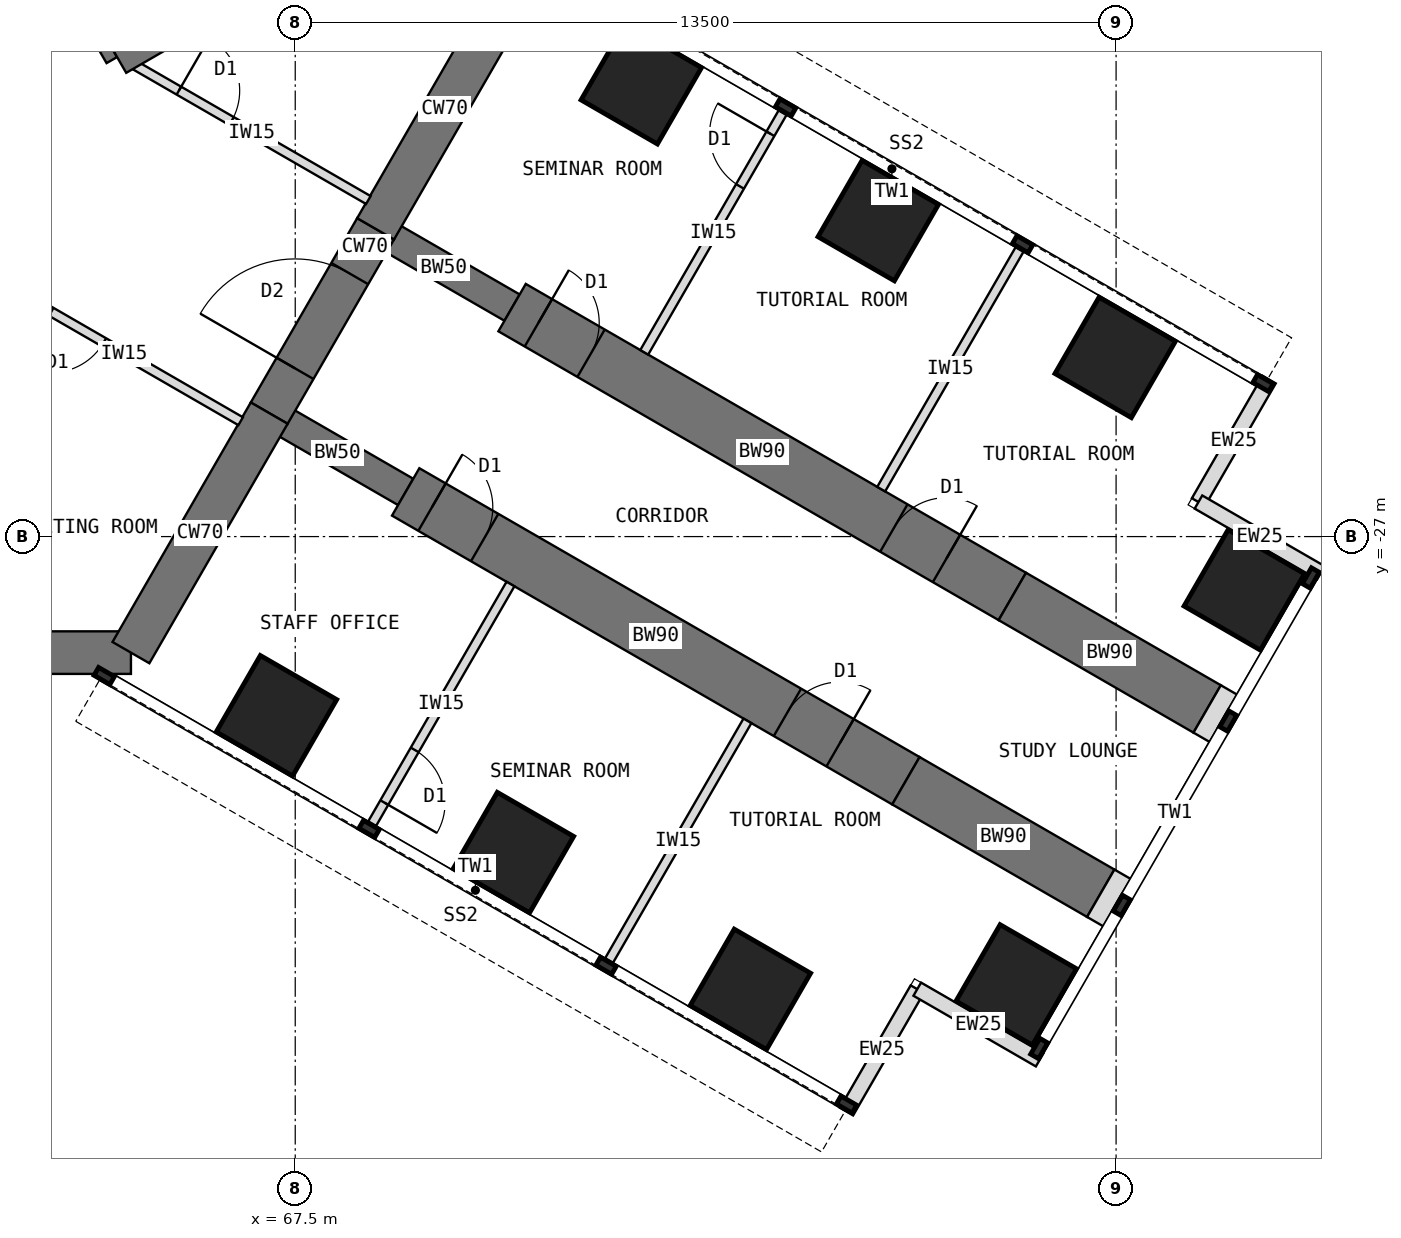
"""IFC4 building model, lengths in metres.
Left out: names, types, materials, properties, quantities, classifications, styles, units other than length and angle.
Written with IfcOpenShell. Run it as: python <this file> out.ifc"""

import sys

from ifc_helpers import new_model, si_unit, direction, frame, frame_2d, origin, origin_2d, place, context, subcontext, project, spatial, rectangle, extrude, element, fill, save


model = new_model("IFC4")
c1 = context("Model", 3, precision=1e-05, world=origin(), true_north=direction((0.0, 1.0)))
c2 = subcontext(c1, "Body", "Model", "MODEL_VIEW")
j1 = project(units=[si_unit("LENGTHUNIT", "METRE"), si_unit("PLANEANGLEUNIT", "RADIAN")], contexts=[c1])
p1 = place(None, origin())
s1 = spatial("IfcSite", under=j1, at=p1, CompositionType="ELEMENT")
p2 = place(p1, origin())
s2 = spatial("IfcBuilding", under=s1, at=p2, CompositionType="ELEMENT")
p3 = place(p2, frame((0.0, 0.0, 68.5)))
s3 = spatial("IfcBuildingStorey", under=s2, at=p3, CompositionType="ELEMENT", Elevation=68.5)
p4 = place(p3, frame((52.202, -28.908, 0.0), z_axis=(0.0, 0.0, 1.0), x_axis=(1.0, 0.0, 0.0)))
e1 = element("IfcWall", 1, at=p4, inside=s3, PredefinedType="SHEAR", context=c2, shape_type="SweptSolid", body=[
    extrude(rectangle(XDim=12.596, YDim=0.7, at=frame_2d((6.298, 0.0))), origin(), (0.0, 0.0, 1.0), 4.0),
])
p5 = place(p3, frame((64.798, -28.908, 0.0), z_axis=(0.0, 0.0, 1.0), x_axis=(0.499984222037, 0.866034513004, 0.0)))
e2 = element("IfcWall", 2, at=p5, inside=s3, PredefinedType="SHEAR", context=c2, shape_type="SweptSolid", body=[
    extrude(rectangle(XDim=4.548, YDim=0.7, at=frame_2d((2.274, 0.0))), origin(), (0.0, 0.0, 1.0), 4.0),
])
p6 = place(p3, frame((67.072, -24.97, 0.0), z_axis=(0.0, 0.0, 1.0), x_axis=(0.500010275428, 0.866019471182, 0.0)))
e3 = element("IfcWall", 3, at=p6, inside=s3, PredefinedType="SHEAR", context=c2, shape_type="SweptSolid", body=[
    extrude(rectangle(XDim=3.5, YDim=0.7, at=frame_2d((1.75, 0.0))), origin(), (0.0, 0.0, 1.0), 4.0),
])
p7 = place(p6, frame((0.85, 0.0, 0.0)))
e4 = element("IfcOpeningElement", 4, at=p7, cuts=e3, PredefinedType="OPENING", context=c2, shape_type="SweptSolid", body=[
    extrude(rectangle(XDim=1.8, YDim=2.1, at=frame_2d((0.9, 1.05))), frame((0.0, 0.36, 0.0), z_axis=(0.0, -1.0, 0.0), x_axis=(1.0, 0.0, 0.0)), (0.0, 0.0, 1.0), 0.72),
])
p8 = place(p3, frame((68.822, -21.939, 0.0), z_axis=(0.0, 0.0, 1.0), x_axis=(0.500024481964, 0.866011268655, 0.0)))
e5 = element("IfcWall", 5, at=p8, inside=s3, PredefinedType="SHEAR", context=c2, shape_type="SweptSolid", body=[
    extrude(rectangle(XDim=4.548, YDim=0.7, at=frame_2d((2.274, 0.0))), origin(), (0.0, 0.0, 1.0), 4.0),
])
p9 = place(p3, frame((68.822, -21.939, 0.0), z_axis=(0.0, 0.0, 1.0), x_axis=(0.866072649678, -0.499918158782, 0.0)))
e6 = element("IfcWall", 6, at=p9, inside=s3, PredefinedType="SHEAR", context=c2, shape_type="SweptSolid", body=[
    extrude(rectangle(XDim=2.592, YDim=0.5, at=frame_2d((1.296, 0.0))), origin(), (0.0, 0.0, 1.0), 4.0),
])
p10 = place(p3, frame((71.066, -23.234, 0.0), z_axis=(0.0, 0.0, 1.0), x_axis=(0.86602681393, -0.499997557548, 0.0)))
e7 = element("IfcWall", 7, at=p10, inside=s3, PredefinedType="SHEAR", context=c2, shape_type="SweptSolid", body=[
    extrude(rectangle(XDim=9.5, YDim=0.9, at=frame_2d((4.75, 0.0))), origin(), (0.0, 0.0, 1.0), 4.0),
])
p11 = place(p10, frame((0.5, 0.0, 0.0)))
e8 = element("IfcOpeningElement", 8, at=p11, cuts=e7, PredefinedType="OPENING", context=c2, shape_type="SweptSolid", body=[
    extrude(rectangle(XDim=1.0, YDim=2.1, at=frame_2d((0.5, 1.05))), frame((0.0, 0.46, 0.0), z_axis=(0.0, -1.0, 0.0), x_axis=(1.0, 0.0, 0.0)), (0.0, 0.0, 1.0), 0.92),
])
p12 = place(p10, frame((7.25, 0.0, 0.0)))
e9 = element("IfcOpeningElement", 9, at=p12, cuts=e7, PredefinedType="OPENING", context=c2, shape_type="SweptSolid", body=[
    extrude(rectangle(XDim=1.0, YDim=2.1, at=frame_2d((0.5, 1.05))), frame((0.0, 0.46, 0.0), z_axis=(0.0, -1.0, 0.0), x_axis=(1.0, 0.0, 0.0)), (0.0, 0.0, 1.0), 0.92),
])
p13 = place(p3, frame((79.294, -27.984, 0.0), z_axis=(0.0, 0.0, 1.0), x_axis=(0.866000971088, -0.500042316284, 0.0)))
e10 = element("IfcWall", 10, at=p13, inside=s3, PredefinedType="SHEAR", context=c2, shape_type="SweptSolid", body=[
    extrude(rectangle(XDim=3.7, YDim=0.9, at=frame_2d((1.85, 0.0))), origin(), (0.0, 0.0, 1.0), 4.0),
])
p14 = place(p3, frame((67.072, -24.97, 0.0), z_axis=(0.0, 0.0, 1.0), x_axis=(0.866031863473, -0.499988811324, 0.0)))
e11 = element("IfcWall", 11, at=p14, inside=s3, PredefinedType="SHEAR", context=c2, shape_type="SweptSolid", body=[
    extrude(rectangle(XDim=2.592, YDim=0.5, at=frame_2d((1.296, 0.0))), origin(), (0.0, 0.0, 1.0), 4.0),
])
p15 = place(p3, frame((69.316, -26.266, 0.0), z_axis=(0.0, 0.0, 1.0), x_axis=(0.86602681393, -0.499997557548, 0.0)))
e12 = element("IfcWall", 12, at=p15, inside=s3, PredefinedType="SHEAR", context=c2, shape_type="SweptSolid", body=[
    extrude(rectangle(XDim=9.5, YDim=0.9, at=frame_2d((4.75, 0.0))), origin(), (0.0, 0.0, 1.0), 4.0),
])
p16 = place(p15, frame((0.5, 0.0, 0.0)))
e13 = element("IfcOpeningElement", 13, at=p16, cuts=e12, PredefinedType="OPENING", context=c2, shape_type="SweptSolid", body=[
    extrude(rectangle(XDim=1.0, YDim=2.1, at=frame_2d((0.5, 1.05))), frame((0.0, 0.46, 0.0), z_axis=(0.0, -1.0, 0.0), x_axis=(1.0, 0.0, 0.0)), (0.0, 0.0, 1.0), 0.92),
])
p17 = place(p15, frame((7.25, 0.0, 0.0)))
e14 = element("IfcOpeningElement", 14, at=p17, cuts=e12, PredefinedType="OPENING", context=c2, shape_type="SweptSolid", body=[
    extrude(rectangle(XDim=1.0, YDim=2.1, at=frame_2d((0.5, 1.05))), frame((0.0, 0.46, 0.0), z_axis=(0.0, -1.0, 0.0), x_axis=(1.0, 0.0, 0.0)), (0.0, 0.0, 1.0), 0.92),
])
p18 = place(p3, frame((77.544, -31.016, 0.0), z_axis=(0.0, 0.0, 1.0), x_axis=(0.866029545028, -0.499992827086, 0.0)))
e15 = element("IfcWall", 15, at=p18, inside=s3, PredefinedType="SHEAR", context=c2, shape_type="SweptSolid", body=[
    extrude(rectangle(XDim=3.7, YDim=0.9, at=frame_2d((1.85, 0.0))), origin(), (0.0, 0.0, 1.0), 4.0),
])
for number, where, z_axis, x_axis in (
    (16, (73.191, -19.554, 0.0), (0.0, 0.0, 1.0), (0.5, 0.866, 0.0)),
    (17, (67.191, -29.946, 0.0), (0.0, 0.0, 1.0), (0.5, 0.866, 0.0)),
    (18, (77.088, -21.804, 0.0), (0.0, 0.0, 1.0), (0.5, 0.866, 0.0)),
    (19, (71.088, -32.196, 0.0), (0.0, 0.0, 1.0), (0.5, 0.866, 0.0)),
    (20, (80.986, -24.054, 0.0), (0.0, 0.0, 1.0), (0.5, 0.866, 0.0)),
    (21, (74.986, -34.446, 0.0), (0.0, 0.0, 1.0), (0.5, 0.866, 0.0)),
    (22, (83.108, -27.877, 0.0), (0.0, 0.0, 1.0), (0.5, 0.866, 0.0)),
    (23, (79.358, -34.373, 0.0), (0.0, 0.0, 1.0), (0.5, 0.866, 0.0)),
):
    element("IfcColumn", number, at=place(p3, frame(where, z_axis=z_axis, x_axis=x_axis)), inside=s3, PredefinedType="COLUMN", context=c2, shape_type="SweptSolid", body=[
        extrude(rectangle(XDim=1.45, YDim=1.45, at=origin_2d()), origin(), (0.0, 0.0, 1.0), 4.0),
    ])
for number, where, z_axis, x_axis in (
    (24, (83.517, -24.419, 0.0), (0.0, 0.0, 1.0), (-0.5, -0.866, 0.0)),
    (25, (82.355, -26.432, 0.0), (0.0, 0.0, 1.0), (0.866, -0.5, 0.0)),
    (26, (76.567, -36.456, 0.0), (0.0, 0.0, 1.0), (0.5, 0.866, 0.0)),
    (27, (77.73, -34.443, 0.0), (0.0, 0.0, 1.0), (0.866, -0.5, 0.0)),
):
    element("IfcWall", number, at=place(p3, frame(where, z_axis=z_axis, x_axis=x_axis)), inside=s3, PredefinedType="STANDARD", context=c2, shape_type="SweptSolid", body=[
        extrude(rectangle(XDim=2.325, YDim=0.25, at=frame_2d((1.163, 0.0))), origin(), (0.0, 0.0, 1.0), 3.8),
    ])
for number, where, z_axis, x_axis in (
    (28, (82.498, -29.834, 0.0), (0.0, 0.0, 1.0), (0.866, -0.5, 0.0)),
    (29, (80.748, -32.865, 0.0), (0.0, 0.0, 1.0), (0.866, -0.5, 0.0)),
):
    element("IfcWall", number, at=place(p3, frame(where, z_axis=z_axis, x_axis=x_axis)), inside=s3, PredefinedType="PARTITIONING", context=c2, shape_type="SweptSolid", body=[
        extrude(rectangle(XDim=0.31, YDim=0.9, at=frame_2d((0.155, 0.0))), origin(), (0.0, 0.0, 1.0), 3.8),
    ])
p19 = place(p3, frame((64.484, -19.164, 0.0), z_axis=(0.0, 0.0, 1.0), x_axis=(-0.49999894854, 0.866026010844, 0.0)))
e30 = element("IfcWall", 30, at=p19, inside=s3, PredefinedType="SHEAR", context=c2, shape_type="SweptSolid", body=[
    extrude(rectangle(XDim=8.0, YDim=0.2, at=frame_2d((4.0, 0.0))), origin(), (0.0, 0.0, 1.0), 4.0),
])
p20 = place(p19, frame((6.3, 0.0, 0.0)))
e31 = element("IfcOpeningElement", 31, at=p20, cuts=e30, PredefinedType="OPENING", context=c2, shape_type="SweptSolid", body=[
    extrude(rectangle(XDim=1.2, YDim=2.1, at=frame_2d((0.6, 1.05))), frame((0.0, 0.11, 0.0), z_axis=(0.0, -1.0, 0.0), x_axis=(1.0, 0.0, 0.0)), (0.0, 0.0, 1.0), 0.22),
])
p21 = place(p19, frame((0.9, 0.0, 0.0)))
e32 = element("IfcOpeningElement", 32, at=p21, cuts=e30, PredefinedType="OPENING", context=c2, shape_type="SweptSolid", body=[
    extrude(rectangle(XDim=1.1, YDim=2.2, at=frame_2d((0.55, 1.1))), frame((0.0, 0.11, 0.0), z_axis=(0.0, -1.0, 0.0), x_axis=(1.0, 0.0, 0.0)), (0.0, 0.0, 1.0), 0.22),
])
p22 = place(p19, frame((3.8, 0.0, 0.0)))
e33 = element("IfcOpeningElement", 33, at=p22, cuts=e30, PredefinedType="OPENING", context=c2, shape_type="SweptSolid", body=[
    extrude(rectangle(XDim=1.1, YDim=2.2, at=frame_2d((0.55, 1.1))), frame((0.0, 0.11, 0.0), z_axis=(0.0, -1.0, 0.0), x_axis=(1.0, 0.0, 0.0)), (0.0, 0.0, 1.0), 0.22),
])
p23 = place(p3, frame((64.62, -19.201, 0.0), z_axis=(0.0, 0.0, 1.0), x_axis=(0.866023886965, 0.500002627198, 0.0)))
e34 = element("IfcWall", 34, at=p23, inside=s3, PredefinedType="SHEAR", context=c2, shape_type="SweptSolid", body=[
    extrude(rectangle(XDim=5.858, YDim=0.4, at=frame_2d((2.929, 0.0))), origin(), (0.0, 0.0, 1.0), 4.0),
])
p24 = place(p3, frame((73.24, -23.97, 0.0), z_axis=(0.0, 0.0, 1.0), x_axis=(0.499982560684, 0.866035472144, 0.0)))
e35 = element("IfcWall", 35, at=p24, inside=s3, PredefinedType="PARTITIONING", context=c2, shape_type="SweptSolid", body=[
    extrude(rectangle(XDim=4.55, YDim=0.15, at=frame_2d((2.275, 0.0))), origin(), (0.0, 0.0, 1.0), 3.8),
])
p25 = place(p24, frame((3.15, 0.0, 0.0)))
e36 = element("IfcOpeningElement", 36, at=p25, cuts=e35, PredefinedType="OPENING", context=c2, shape_type="SweptSolid", body=[
    extrude(rectangle(XDim=1.0, YDim=2.1, at=frame_2d((0.5, 1.05))), frame((0.0, 0.085, 0.0), z_axis=(0.0, -1.0, 0.0), x_axis=(1.0, 0.0, 0.0)), (0.0, 0.0, 1.0), 0.17),
])
p26 = place(p3, frame((77.137, -26.22, 0.0), z_axis=(0.0, 0.0, 1.0), x_axis=(0.500022803284, 0.866012237902, 0.0)))
e37 = element("IfcWall", 37, at=p26, inside=s3, PredefinedType="PARTITIONING", context=c2, shape_type="SweptSolid", body=[
    extrude(rectangle(XDim=4.55, YDim=0.15, at=frame_2d((2.275, 0.0))), origin(), (0.0, 0.0, 1.0), 3.8),
])
p27 = place(p3, frame((71.04, -27.78, 0.0), z_axis=(0.0, 0.0, 1.0), x_axis=(-0.499982560684, -0.866035472144, 0.0)))
e38 = element("IfcWall", 38, at=p27, inside=s3, PredefinedType="PARTITIONING", context=c2, shape_type="SweptSolid", body=[
    extrude(rectangle(XDim=4.55, YDim=0.15, at=frame_2d((2.275, 0.0))), origin(), (0.0, 0.0, 1.0), 3.8),
])
p28 = place(p27, frame((3.15, 0.0, 0.0)))
e39 = element("IfcOpeningElement", 39, at=p28, cuts=e38, PredefinedType="OPENING", context=c2, shape_type="SweptSolid", body=[
    extrude(rectangle(XDim=1.0, YDim=2.1, at=frame_2d((0.5, 1.05))), frame((0.0, 0.085, 0.0), z_axis=(0.0, -1.0, 0.0), x_axis=(1.0, 0.0, 0.0)), (0.0, 0.0, 1.0), 0.17),
])
p29 = place(p3, frame((74.937, -30.03, 0.0), z_axis=(0.0, 0.0, 1.0), x_axis=(-0.499982560684, -0.866035472144, 0.0)))
e40 = element("IfcWall", 40, at=p29, inside=s3, PredefinedType="PARTITIONING", context=c2, shape_type="SweptSolid", body=[
    extrude(rectangle(XDim=4.55, YDim=0.15, at=frame_2d((2.275, 0.0))), origin(), (0.0, 0.0, 1.0), 3.8),
])
p30 = place(p3, frame((64.87, -19.253, 0.0), z_axis=(0.0, 0.0, 1.0), x_axis=(0.866021148949, -0.500007369519, 0.0)))
e41 = element("IfcWall", 41, at=p30, inside=s3, PredefinedType="PARTITIONING", context=c2, shape_type="SweptSolid", body=[
    extrude(rectangle(XDim=4.426, YDim=0.15, at=frame_2d((2.213, 0.0))), origin(), (0.0, 0.0, 1.0), 3.8),
])
p31 = place(p30, frame((0.828, 0.0, 0.0)))
e42 = element("IfcOpeningElement", 42, at=p31, cuts=e41, PredefinedType="OPENING", context=c2, shape_type="SweptSolid", body=[
    extrude(rectangle(XDim=1.0, YDim=2.1, at=frame_2d((0.5, 1.05))), frame((0.0, 0.085, 0.0), z_axis=(0.0, -1.0, 0.0), x_axis=(1.0, 0.0, 0.0)), (0.0, 0.0, 1.0), 0.17),
])
p32 = place(p3, frame((66.603, -25.103, 0.0), z_axis=(0.0, 0.0, 1.0), x_axis=(-0.866021148949, 0.500007369519, 0.0)))
e43 = element("IfcWall", 43, at=p32, inside=s3, PredefinedType="PARTITIONING", context=c2, shape_type="SweptSolid", body=[
    extrude(rectangle(XDim=4.426, YDim=0.15, at=frame_2d((2.213, 0.0))), origin(), (0.0, 0.0, 1.0), 3.8),
])
p33 = place(p32, frame((2.598, 0.0, 0.0)))
e44 = element("IfcOpeningElement", 44, at=p33, cuts=e43, PredefinedType="OPENING", context=c2, shape_type="SweptSolid", body=[
    extrude(rectangle(XDim=1.0, YDim=2.1, at=frame_2d((0.5, 1.05))), frame((0.0, 0.085, 0.0), z_axis=(0.0, -1.0, 0.0), x_axis=(1.0, 0.0, 0.0)), (0.0, 0.0, 1.0), 0.17),
])
p34 = place(p7, origin())
e45 = element("IfcDoor", 45, at=p34, inside=s3, OperationType="DOUBLE_DOOR_DOUBLE_SWING", PredefinedType="DOOR", context=c2, shape_type="SweptSolid", body=[
    extrude(rectangle(XDim=1.72, YDim=2.06, at=frame_2d((0.9, 1.03))), frame((0.0, 0.025, 0.0), z_axis=(0.0, -1.0, 0.0), x_axis=(1.0, 0.0, 0.0)), (0.0, 0.0, 1.0), 0.05),
    extrude(rectangle(XDim=0.04, YDim=2.1, at=frame_2d((0.02, 1.05))), frame((0.0, 0.35, 0.0), z_axis=(0.0, -1.0, 0.0), x_axis=(1.0, 0.0, 0.0)), (0.0, 0.0, 1.0), 0.699),
    extrude(rectangle(XDim=0.04, YDim=2.1, at=frame_2d((1.78, 1.05))), frame((0.0, 0.35, 0.0), z_axis=(0.0, -1.0, 0.0), x_axis=(1.0, 0.0, 0.0)), (0.0, 0.0, 1.0), 0.699),
    extrude(rectangle(XDim=1.72, YDim=0.04, at=frame_2d((0.9, 2.08))), frame((0.0, 0.35, 0.0), z_axis=(0.0, -1.0, 0.0), x_axis=(1.0, 0.0, 0.0)), (0.0, 0.0, 1.0), 0.699),
])
fill(e4, e45)
p35 = place(p25, origin())
e46 = element("IfcDoor", 46, at=p35, inside=s3, OperationType="SINGLE_SWING_RIGHT", PredefinedType="DOOR", context=c2, shape_type="SweptSolid", body=[
    extrude(rectangle(XDim=1.0, YDim=2.1, at=frame_2d((0.5, 1.05))), frame((0.0, 0.025, 0.0), z_axis=(0.0, -1.0, 0.0), x_axis=(1.0, 0.0, 0.0)), (0.0, 0.0, 1.0), 0.05),
])
fill(e36, e46)
p36 = place(p28, origin())
e47 = element("IfcDoor", 47, at=p36, inside=s3, OperationType="SINGLE_SWING_RIGHT", PredefinedType="DOOR", context=c2, shape_type="SweptSolid", body=[
    extrude(rectangle(XDim=1.0, YDim=2.1, at=frame_2d((0.5, 1.05))), frame((0.0, 0.025, 0.0), z_axis=(0.0, -1.0, 0.0), x_axis=(1.0, 0.0, 0.0)), (0.0, 0.0, 1.0), 0.05),
])
fill(e39, e47)
p37 = place(p33, origin())
e48 = element("IfcDoor", 48, at=p37, inside=s3, OperationType="SINGLE_SWING_RIGHT", PredefinedType="DOOR", context=c2, shape_type="SweptSolid", body=[
    extrude(rectangle(XDim=1.0, YDim=2.1, at=frame_2d((0.5, 1.05))), frame((0.0, 0.025, 0.0), z_axis=(0.0, -1.0, 0.0), x_axis=(1.0, 0.0, 0.0)), (0.0, 0.0, 1.0), 0.05),
])
fill(e44, e48)
p38 = place(p31, origin())
e49 = element("IfcDoor", 49, at=p38, inside=s3, OperationType="SINGLE_SWING_LEFT", PredefinedType="DOOR", context=c2, shape_type="SweptSolid", body=[
    extrude(rectangle(XDim=1.0, YDim=2.1, at=frame_2d((0.5, 1.05))), frame((0.0, 0.025, 0.0), z_axis=(0.0, -1.0, 0.0), x_axis=(1.0, 0.0, 0.0)), (0.0, 0.0, 1.0), 0.05),
])
fill(e42, e49)
p39 = place(p11, origin())
e50 = element("IfcDoor", 50, at=p39, inside=s3, OperationType="SINGLE_SWING_LEFT", PredefinedType="DOOR", context=c2, shape_type="SweptSolid", body=[
    extrude(rectangle(XDim=0.92, YDim=2.06, at=frame_2d((0.5, 1.03))), frame((0.0, 0.025, 0.0), z_axis=(0.0, -1.0, 0.0), x_axis=(1.0, 0.0, 0.0)), (0.0, 0.0, 1.0), 0.05),
    extrude(rectangle(XDim=0.04, YDim=2.1, at=frame_2d((0.02, 1.05))), frame((0.0, 0.45, 0.0), z_axis=(0.0, -1.0, 0.0), x_axis=(1.0, 0.0, 0.0)), (0.0, 0.0, 1.0), 0.899),
    extrude(rectangle(XDim=0.04, YDim=2.1, at=frame_2d((0.98, 1.05))), frame((0.0, 0.45, 0.0), z_axis=(0.0, -1.0, 0.0), x_axis=(1.0, 0.0, 0.0)), (0.0, 0.0, 1.0), 0.899),
    extrude(rectangle(XDim=0.92, YDim=0.04, at=frame_2d((0.5, 2.08))), frame((0.0, 0.45, 0.0), z_axis=(0.0, -1.0, 0.0), x_axis=(1.0, 0.0, 0.0)), (0.0, 0.0, 1.0), 0.899),
])
fill(e8, e50)
p40 = place(p12, origin())
e51 = element("IfcDoor", 51, at=p40, inside=s3, OperationType="SINGLE_SWING_RIGHT", PredefinedType="DOOR", context=c2, shape_type="SweptSolid", body=[
    extrude(rectangle(XDim=0.92, YDim=2.06, at=frame_2d((0.5, 1.03))), frame((0.0, 0.025, 0.0), z_axis=(0.0, -1.0, 0.0), x_axis=(1.0, 0.0, 0.0)), (0.0, 0.0, 1.0), 0.05),
    extrude(rectangle(XDim=0.04, YDim=2.1, at=frame_2d((0.02, 1.05))), frame((0.0, 0.45, 0.0), z_axis=(0.0, -1.0, 0.0), x_axis=(1.0, 0.0, 0.0)), (0.0, 0.0, 1.0), 0.899),
    extrude(rectangle(XDim=0.04, YDim=2.1, at=frame_2d((0.98, 1.05))), frame((0.0, 0.45, 0.0), z_axis=(0.0, -1.0, 0.0), x_axis=(1.0, 0.0, 0.0)), (0.0, 0.0, 1.0), 0.899),
    extrude(rectangle(XDim=0.92, YDim=0.04, at=frame_2d((0.5, 2.08))), frame((0.0, 0.45, 0.0), z_axis=(0.0, -1.0, 0.0), x_axis=(1.0, 0.0, 0.0)), (0.0, 0.0, 1.0), 0.899),
])
fill(e9, e51)
p41 = place(p16, origin())
e52 = element("IfcDoor", 52, at=p41, inside=s3, OperationType="SINGLE_SWING_LEFT", PredefinedType="DOOR", context=c2, shape_type="SweptSolid", body=[
    extrude(rectangle(XDim=0.92, YDim=2.06, at=frame_2d((0.5, 1.03))), frame((0.0, 0.025, 0.0), z_axis=(0.0, -1.0, 0.0), x_axis=(1.0, 0.0, 0.0)), (0.0, 0.0, 1.0), 0.05),
    extrude(rectangle(XDim=0.04, YDim=2.1, at=frame_2d((0.02, 1.05))), frame((0.0, 0.45, 0.0), z_axis=(0.0, -1.0, 0.0), x_axis=(1.0, 0.0, 0.0)), (0.0, 0.0, 1.0), 0.899),
    extrude(rectangle(XDim=0.04, YDim=2.1, at=frame_2d((0.98, 1.05))), frame((0.0, 0.45, 0.0), z_axis=(0.0, -1.0, 0.0), x_axis=(1.0, 0.0, 0.0)), (0.0, 0.0, 1.0), 0.899),
    extrude(rectangle(XDim=0.92, YDim=0.04, at=frame_2d((0.5, 2.08))), frame((0.0, 0.45, 0.0), z_axis=(0.0, -1.0, 0.0), x_axis=(1.0, 0.0, 0.0)), (0.0, 0.0, 1.0), 0.899),
])
fill(e13, e52)
p42 = place(p17, origin())
e53 = element("IfcDoor", 53, at=p42, inside=s3, OperationType="SINGLE_SWING_RIGHT", PredefinedType="DOOR", context=c2, shape_type="SweptSolid", body=[
    extrude(rectangle(XDim=0.92, YDim=2.06, at=frame_2d((0.5, 1.03))), frame((0.0, 0.025, 0.0), z_axis=(0.0, -1.0, 0.0), x_axis=(1.0, 0.0, 0.0)), (0.0, 0.0, 1.0), 0.05),
    extrude(rectangle(XDim=0.04, YDim=2.1, at=frame_2d((0.02, 1.05))), frame((0.0, 0.45, 0.0), z_axis=(0.0, -1.0, 0.0), x_axis=(1.0, 0.0, 0.0)), (0.0, 0.0, 1.0), 0.899),
    extrude(rectangle(XDim=0.04, YDim=2.1, at=frame_2d((0.98, 1.05))), frame((0.0, 0.45, 0.0), z_axis=(0.0, -1.0, 0.0), x_axis=(1.0, 0.0, 0.0)), (0.0, 0.0, 1.0), 0.899),
    extrude(rectangle(XDim=0.92, YDim=0.04, at=frame_2d((0.5, 2.08))), frame((0.0, 0.45, 0.0), z_axis=(0.0, -1.0, 0.0), x_axis=(1.0, 0.0, 0.0)), (0.0, 0.0, 1.0), 0.899),
])
fill(e14, e53)
save(model, sys.argv[1])
